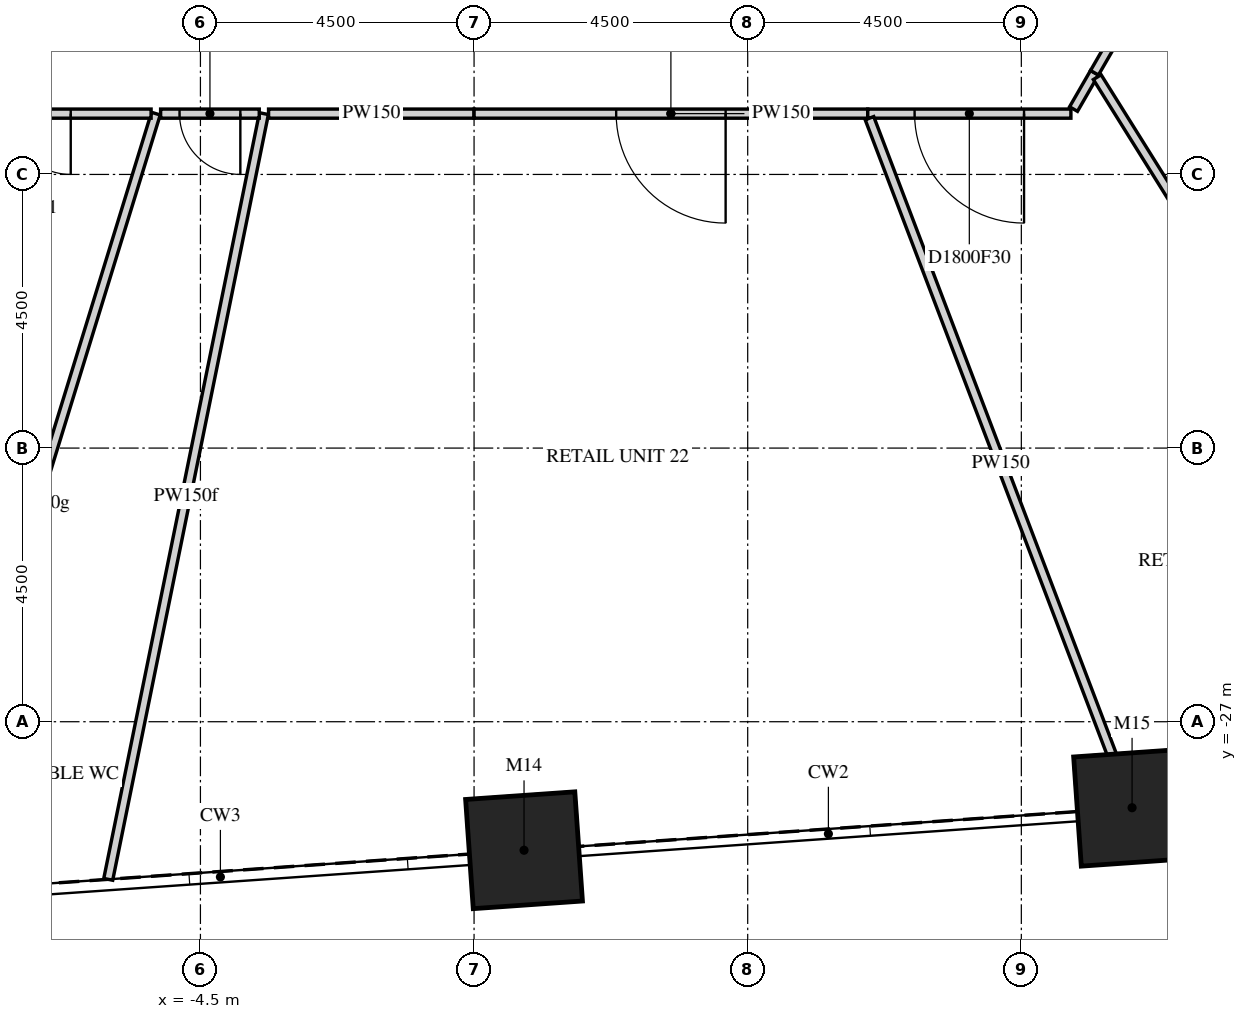
"""IFC4 building model, lengths in metres.
Left out: names, types, materials, properties, quantities, classifications, styles, units other than length and angle.
Written with IfcOpenShell. Run it as: python <this file> out.ifc"""

import sys

from ifc_helpers import new_model, si_unit, direction, frame, frame_2d, origin, origin_2d, place, context, subcontext, project, spatial, rectangle, extrude, element, fill, save


model = new_model("IFC4")
c1 = context("Model", 3, precision=1e-05, world=origin(), true_north=direction((0.0, 1.0)))
c2 = subcontext(c1, "Body", "Model", "MODEL_VIEW")
j1 = project(units=[si_unit("LENGTHUNIT", "METRE"), si_unit("PLANEANGLEUNIT", "RADIAN")], contexts=[c1])
p1 = place(None, origin())
s1 = spatial("IfcSite", under=j1, at=p1, CompositionType="ELEMENT")
p2 = place(p1, origin())
s2 = spatial("IfcBuilding", under=s1, at=p2, CompositionType="ELEMENT")
p3 = place(p2, frame((0.0, 0.0, 15.0)))
s3 = spatial("IfcBuildingStorey", under=s2, at=p3, CompositionType="ELEMENT", Elevation=15.0)
for number, where, z_axis, x_axis in (
    (1, (0.822, -29.114, -0.25), (0.0, 0.0, 1.0), (-0.998, -0.07, 0.0)),
    (2, (10.821, -28.414, -0.25), (0.0, 0.0, 1.0), (-0.998, -0.07, 0.0)),
):
    element("IfcColumn", number, at=place(p3, frame(where, z_axis=z_axis, x_axis=x_axis)), inside=s3, PredefinedType="COLUMN", context=c2, shape_type="SweptSolid", body=[
        extrude(rectangle(XDim=1.8, YDim=1.8, at=origin_2d()), origin(), (0.0, 0.0, 1.0), 5.5),
    ])
p4 = place(p3, frame((-9.177, -29.813, 0.0), z_axis=(0.0, 0.0, 1.0), x_axis=(0.29419717946, 0.955744746048, 0.0)))
e3 = element("IfcWall", 3, at=p4, inside=s3, PredefinedType="PARTITIONING", context=c2, shape_type="SweptSolid", body=[
    extrude(rectangle(XDim=13.406, YDim=0.15, at=frame_2d((6.703, 0.0))), origin(), (0.0, 0.0, 1.0), 4.488),
])
p5 = place(p3, frame((-5.312, -17.0, 0.0), z_axis=(0.0, 0.0, 1.0), x_axis=(-1.0, 0.0, 0.0)))
e4 = element("IfcWall", 4, at=p5, inside=s3, PredefinedType="PARTITIONING", context=c2, shape_type="SweptSolid", body=[
    extrude(rectangle(XDim=3.643, YDim=0.15, at=frame_2d((1.821, 0.0))), origin(), (0.0, 0.0, 1.0), 5.25),
])
p6 = place(p5, frame((1.321, 0.0, 0.0)))
e5 = element("IfcOpeningElement", 5, at=p6, cuts=e4, PredefinedType="OPENING", context=c2, shape_type="SweptSolid", body=[
    extrude(rectangle(XDim=1.0, YDim=2.1, at=frame_2d((0.5, 1.05))), frame((0.0, 0.085, 0.0), z_axis=(0.0, -1.0, 0.0), x_axis=(1.0, 0.0, 0.0)), (0.0, 0.0, 1.0), 0.17),
])
p7 = place(p3, frame((-6.016, -29.592, 0.0), z_axis=(0.0, 0.0, 1.0), x_axis=(0.199231841521, 0.979952383192, 0.0)))
e6 = element("IfcWall", 6, at=p7, inside=s3, PredefinedType="PARTITIONING", context=c2, shape_type="SweptSolid", body=[
    extrude(rectangle(XDim=12.85, YDim=0.15, at=frame_2d((6.425, 0.0))), origin(), (0.0, 0.0, 1.0), 4.496),
])
p8 = place(p3, frame((-3.532, -17.0, 0.0), z_axis=(0.0, 0.0, 1.0), x_axis=(-1.0, 0.0, 0.0)))
e7 = element("IfcWall", 7, at=p8, inside=s3, PredefinedType="PARTITIONING", context=c2, shape_type="SweptSolid", body=[
    extrude(rectangle(XDim=1.622, YDim=0.15, at=frame_2d((0.811, 0.0))), origin(), (0.0, 0.0, 1.0), 5.25),
])
p9 = place(p8, frame((0.311, 0.0, 0.0)))
e8 = element("IfcOpeningElement", 8, at=p9, cuts=e7, PredefinedType="OPENING", context=c2, shape_type="SweptSolid", body=[
    extrude(rectangle(XDim=1.0, YDim=2.1, at=frame_2d((0.5, 1.05))), frame((0.0, 0.085, 0.0), z_axis=(0.0, -1.0, 0.0), x_axis=(1.0, 0.0, 0.0)), (0.0, 0.0, 1.0), 0.17),
])
p10 = place(p3, frame((-3.379, -17.0, 0.0), z_axis=(0.0, 0.0, 1.0), x_axis=(1.0, 0.0, 0.0)))
e9 = element("IfcWall", 9, at=p10, inside=s3, PredefinedType="PARTITIONING", context=c2, shape_type="SweptSolid", body=[
    extrude(rectangle(XDim=3.379, YDim=0.15, at=frame_2d((1.69, 0.0))), origin(), (0.0, 0.0, 1.0), 5.25),
])
p11 = place(p3, frame((6.474, -17.0, 0.0), z_axis=(0.0, 0.0, 1.0), x_axis=(-1.0, 0.0, 0.0)))
e10 = element("IfcWall", 10, at=p11, inside=s3, PredefinedType="PARTITIONING", context=c2, shape_type="SweptSolid", body=[
    extrude(rectangle(XDim=6.474, YDim=0.15, at=frame_2d((3.237, 0.0))), origin(), (0.0, 0.0, 1.0), 5.25),
])
p12 = place(p11, frame((2.337, 0.0, 0.0)))
e11 = element("IfcOpeningElement", 11, at=p12, cuts=e10, PredefinedType="OPENING", context=c2, shape_type="SweptSolid", body=[
    extrude(rectangle(XDim=1.8, YDim=2.1, at=frame_2d((0.9, 1.05))), frame((0.0, 0.085, 0.0), z_axis=(0.0, -1.0, 0.0), x_axis=(1.0, 0.0, 0.0)), (0.0, 0.0, 1.0), 0.17),
])
p13 = place(p3, frame((9.815, -17.0, 0.0), z_axis=(0.0, 0.0, 1.0), x_axis=(-1.0, 0.0, 0.0)))
e12 = element("IfcWall", 12, at=p13, inside=s3, PredefinedType="PARTITIONING", context=c2, shape_type="SweptSolid", body=[
    extrude(rectangle(XDim=3.341, YDim=0.15, at=frame_2d((1.67, 0.0))), origin(), (0.0, 0.0, 1.0), 5.25),
])
p14 = place(p13, frame((0.771, 0.0, 0.0)))
e13 = element("IfcOpeningElement", 13, at=p14, cuts=e12, PredefinedType="OPENING", context=c2, shape_type="SweptSolid", body=[
    extrude(rectangle(XDim=1.8, YDim=2.1, at=frame_2d((0.9, 1.05))), frame((0.0, 0.085, 0.0), z_axis=(0.0, -1.0, 0.0), x_axis=(1.0, 0.0, 0.0)), (0.0, 0.0, 1.0), 0.17),
])
p15 = place(p3, frame((9.858, -16.925, 0.0), z_axis=(0.0, 0.0, 1.0), x_axis=(0.499681576323, 0.866209167744, 0.0)))
e14 = element("IfcWall", 14, at=p15, inside=s3, PredefinedType="PARTITIONING", context=c2, shape_type="SweptSolid", body=[
    extrude(rectangle(XDim=0.689, YDim=0.15, at=frame_2d((0.345, 0.0))), origin(), (0.0, 0.0, 1.0), 5.25),
])
p16 = place(p3, frame((12.148, -12.959, 0.0), z_axis=(0.0, 0.0, 1.0), x_axis=(-0.500006760876, -0.866021500355, 0.0)))
e15 = element("IfcWall", 15, at=p16, inside=s3, PredefinedType="PARTITIONING", context=c2, shape_type="SweptSolid", body=[
    extrude(rectangle(XDim=3.89, YDim=0.15, at=frame_2d((1.945, 0.0))), origin(), (0.0, 0.0, 1.0), 5.25),
])
p17 = place(p16, frame((1.045, 0.0, 0.0)))
e16 = element("IfcOpeningElement", 16, at=p17, cuts=e15, PredefinedType="OPENING", context=c2, shape_type="SweptSolid", body=[
    extrude(rectangle(XDim=1.8, YDim=2.1, at=frame_2d((0.9, 1.05))), frame((0.0, 0.085, 0.0), z_axis=(0.0, -1.0, 0.0), x_axis=(1.0, 0.0, 0.0)), (0.0, 0.0, 1.0), 0.17),
])
p18 = place(p3, frame((10.821, -28.414, 0.0), z_axis=(0.0, 0.0, 1.0), x_axis=(-0.355901613379, 0.934523430201, 0.0)))
e17 = element("IfcWall", 17, at=p18, inside=s3, PredefinedType="PARTITIONING", context=c2, shape_type="SweptSolid", body=[
    extrude(rectangle(XDim=12.134, YDim=0.15, at=frame_2d((6.067, 0.0))), origin(), (0.0, 0.0, 1.0), 5.25),
])
p19 = place(p3, frame((17.225, -27.566, 0.0), z_axis=(0.0, 0.0, 1.0), x_axis=(-0.529913932499, 0.848051427771, 0.0)))
e18 = element("IfcWall", 18, at=p19, inside=s3, PredefinedType="PARTITIONING", context=c2, shape_type="SweptSolid", body=[
    extrude(rectangle(XDim=13.167, YDim=0.15, at=frame_2d((6.583, 0.0))), origin(), (0.0, 0.0, 1.0), 4.488),
])
p20 = place(p6, origin())
e19 = element("IfcDoor", 19, at=p20, inside=s3, OperationType="SINGLE_SWING_RIGHT", PredefinedType="DOOR", context=c2, shape_type="SweptSolid", body=[
    extrude(rectangle(XDim=1.0, YDim=2.1, at=frame_2d((0.5, 1.05))), frame((0.0, 0.025, 0.0), z_axis=(0.0, -1.0, 0.0), x_axis=(1.0, 0.0, 0.0)), (0.0, 0.0, 1.0), 0.05),
])
fill(e5, e19)
p21 = place(p9, origin())
e20 = element("IfcDoor", 20, at=p21, inside=s3, OperationType="SINGLE_SWING_LEFT", PredefinedType="DOOR", context=c2, shape_type="SweptSolid", body=[
    extrude(rectangle(XDim=1.0, YDim=2.1, at=frame_2d((0.5, 1.05))), frame((0.0, 0.025, 0.0), z_axis=(0.0, -1.0, 0.0), x_axis=(1.0, 0.0, 0.0)), (0.0, 0.0, 1.0), 0.05),
])
fill(e8, e20)
p22 = place(p12, origin())
e21 = element("IfcDoor", 21, at=p22, inside=s3, OperationType="DOUBLE_DOOR_SINGLE_SWING", PredefinedType="DOOR", context=c2, shape_type="SweptSolid", body=[
    extrude(rectangle(XDim=1.8, YDim=2.1, at=frame_2d((0.9, 1.05))), frame((0.0, 0.025, 0.0), z_axis=(0.0, -1.0, 0.0), x_axis=(1.0, 0.0, 0.0)), (0.0, 0.0, 1.0), 0.05),
])
fill(e11, e21)
p23 = place(p14, origin())
e22 = element("IfcDoor", 22, at=p23, inside=s3, OperationType="DOUBLE_DOOR_SINGLE_SWING", PredefinedType="DOOR", context=c2, shape_type="SweptSolid", body=[
    extrude(rectangle(XDim=1.8, YDim=2.1, at=frame_2d((0.9, 1.05))), frame((0.0, 0.025, 0.0), z_axis=(0.0, -1.0, 0.0), x_axis=(1.0, 0.0, 0.0)), (0.0, 0.0, 1.0), 0.05),
])
fill(e13, e22)
save(model, sys.argv[1])
